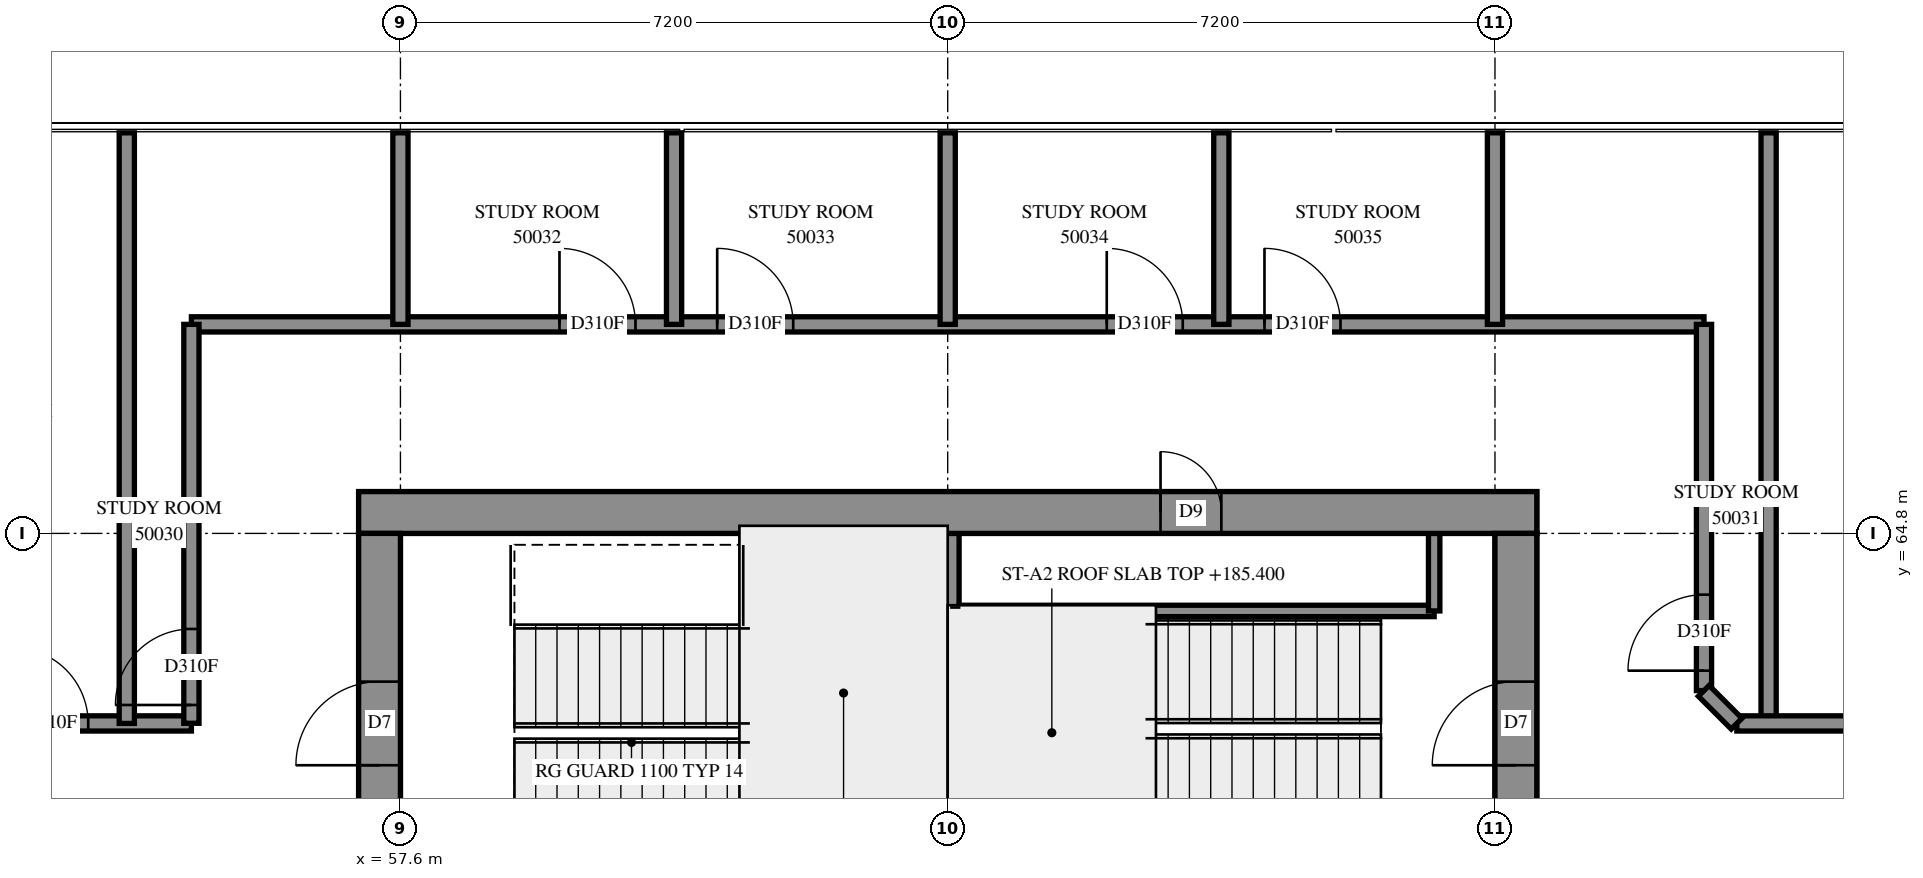
"""IFC4 building model, lengths in metres.
Left out: names, types, materials, properties, quantities, classifications, styles, units other than length and angle.
Written with IfcOpenShell. Run it as: python <this file> out.ifc"""

import sys

from ifc_helpers import new_model, si_unit, direction, frame, frame_2d, origin, place, context, subcontext, project, spatial, rectangle, extrude, element, fill, save


model = new_model("IFC4")
c1 = context("Model", 3, precision=1e-05, world=origin(), true_north=direction((0.0, 1.0)))
c2 = subcontext(c1, "Body", "Model", "MODEL_VIEW")
j1 = project(units=[si_unit("LENGTHUNIT", "METRE"), si_unit("PLANEANGLEUNIT", "RADIAN")], contexts=[c1])
p1 = place(None, origin())
s1 = spatial("IfcSite", under=j1, at=p1, CompositionType="ELEMENT")
p2 = place(p1, origin())
s2 = spatial("IfcBuilding", under=s1, at=p2, CompositionType="ELEMENT")
p3 = place(p2, frame((0.0, 0.0, 185.4)))
s3 = spatial("IfcBuildingStorey", under=s2, at=p3, CompositionType="ELEMENT", Elevation=185.4)
p4 = place(p3, frame((57.05, 65.075, -0.3), z_axis=(0.0, 0.0, 1.0), x_axis=(1.0, 0.0, 0.0)))
e1 = element("IfcWall", 1, at=p4, inside=s3, PredefinedType="SHEAR", context=c2, shape_type="SweptSolid", body=[
    extrude(rectangle(XDim=15.5, YDim=0.55, at=frame_2d((7.75, 0.0))), origin(), (0.0, 0.0, 1.0), 3.5),
])
p5 = place(p4, frame((10.55, 0.0, 0.3)))
e2 = element("IfcOpeningElement", 2, at=p5, cuts=e1, PredefinedType="OPENING", context=c2, shape_type="SweptSolid", body=[
    extrude(rectangle(XDim=0.8, YDim=2.1, at=frame_2d((0.4, 1.05))), frame((0.0, 0.285, 0.0), z_axis=(0.0, -1.0, 0.0), x_axis=(1.0, 0.0, 0.0)), (0.0, 0.0, 1.0), 0.57),
])
p6 = place(p3, frame((57.325, 50.4, -0.3), z_axis=(0.0, 0.0, 1.0), x_axis=(0.0, 1.0, 0.0)))
e3 = element("IfcWall", 3, at=p6, inside=s3, PredefinedType="SHEAR", context=c2, shape_type="SweptSolid", body=[
    extrude(rectangle(XDim=14.4, YDim=0.55, at=frame_2d((7.2, 0.0))), origin(), (0.0, 0.0, 1.0), 3.5),
])
p7 = place(p6, frame((4.55, 0.0, 0.3)))
e4 = element("IfcOpeningElement", 4, at=p7, cuts=e3, PredefinedType="OPENING", context=c2, shape_type="SweptSolid", body=[
    extrude(rectangle(XDim=1.1, YDim=2.1, at=frame_2d((0.55, 1.05))), frame((0.0, 0.285, 0.0), z_axis=(0.0, -1.0, 0.0), x_axis=(1.0, 0.0, 0.0)), (0.0, 0.0, 1.0), 0.57),
])
p8 = place(p6, frame((11.35, 0.0, 0.3)))
e5 = element("IfcOpeningElement", 5, at=p8, cuts=e3, PredefinedType="OPENING", context=c2, shape_type="SweptSolid", body=[
    extrude(rectangle(XDim=1.1, YDim=2.1, at=frame_2d((0.55, 1.05))), frame((0.0, 0.285, 0.0), z_axis=(0.0, -1.0, 0.0), x_axis=(1.0, 0.0, 0.0)), (0.0, 0.0, 1.0), 0.57),
])
p9 = place(p3, frame((72.275, 50.4, -0.3), z_axis=(0.0, 0.0, 1.0), x_axis=(0.0, 1.0, 0.0)))
e6 = element("IfcWall", 6, at=p9, inside=s3, PredefinedType="SHEAR", context=c2, shape_type="SweptSolid", body=[
    extrude(rectangle(XDim=14.4, YDim=0.55, at=frame_2d((7.2, 0.0))), origin(), (0.0, 0.0, 1.0), 3.5),
])
p10 = place(p9, frame((4.55, 0.0, 0.3)))
e7 = element("IfcOpeningElement", 7, at=p10, cuts=e6, PredefinedType="OPENING", context=c2, shape_type="SweptSolid", body=[
    extrude(rectangle(XDim=1.1, YDim=2.1, at=frame_2d((0.55, 1.05))), frame((0.0, 0.285, 0.0), z_axis=(0.0, -1.0, 0.0), x_axis=(1.0, 0.0, 0.0)), (0.0, 0.0, 1.0), 0.57),
])
p11 = place(p9, frame((11.35, 0.0, 0.3)))
e8 = element("IfcOpeningElement", 8, at=p11, cuts=e6, PredefinedType="OPENING", context=c2, shape_type="SweptSolid", body=[
    extrude(rectangle(XDim=1.1, YDim=2.1, at=frame_2d((0.55, 1.05))), frame((0.0, 0.285, 0.0), z_axis=(0.0, -1.0, 0.0), x_axis=(1.0, 0.0, 0.0)), (0.0, 0.0, 1.0), 0.57),
])
p12 = place(p3, frame((64.8, 60.6, 0.0), z_axis=(0.0, 0.0, 1.0), x_axis=(0.0, 1.0, 0.0)))
e9 = element("IfcWall", 9, at=p12, inside=s3, PredefinedType="SOLIDWALL", context=c2, shape_type="SweptSolid", body=[
    extrude(rectangle(XDim=4.2, YDim=0.3, at=frame_2d((2.1, 0.0))), origin(), (0.0, 0.0, 1.0), 3.9),
])
p13 = place(p3, frame((64.95, 63.78, 0.0), z_axis=(0.0, 0.0, 1.0), x_axis=(1.0, 0.0, 0.0)))
e10 = element("IfcWall", 10, at=p13, inside=s3, PredefinedType="PARTITIONING", context=c2, shape_type="SweptSolid", body=[
    extrude(rectangle(XDim=6.25, YDim=0.15, at=frame_2d((3.125, 0.0))), origin(), (0.0, 0.0, 1.0), 3.9),
])
p14 = place(p3, frame((71.2, 63.78, 0.0), z_axis=(0.0, 0.0, 1.0), x_axis=(0.0, 1.0, 0.0)))
e11 = element("IfcWall", 11, at=p14, inside=s3, PredefinedType="PARTITIONING", context=c2, shape_type="SweptSolid", body=[
    extrude(rectangle(XDim=1.02, YDim=0.15, at=frame_2d((0.51, 0.0))), origin(), (0.0, 0.0, 1.0), 3.9),
])
p15 = place(p3, frame((54.85, 67.55, 0.0), z_axis=(0.0, 0.0, 1.0), x_axis=(1.0, 0.0, 0.0)))
e12 = element("IfcWall", 12, at=p15, inside=s3, PredefinedType="PARTITIONING", context=c2, shape_type="SweptSolid", body=[
    extrude(rectangle(XDim=19.9, YDim=0.2, at=frame_2d((9.95, 0.0))), origin(), (0.0, 0.0, 1.0), 3.9),
])
p16 = place(p15, frame((4.843, 0.0, 0.0)))
e13 = element("IfcOpeningElement", 13, at=p16, cuts=e12, PredefinedType="OPENING", context=c2, shape_type="SweptSolid", body=[
    extrude(rectangle(XDim=1.0, YDim=2.1, at=frame_2d((0.5, 1.05))), frame((0.0, 0.11, 0.0), z_axis=(0.0, -1.0, 0.0), x_axis=(1.0, 0.0, 0.0)), (0.0, 0.0, 1.0), 0.22),
])
p17 = place(p15, frame((6.918, 0.0, 0.0)))
e14 = element("IfcOpeningElement", 14, at=p17, cuts=e12, PredefinedType="OPENING", context=c2, shape_type="SweptSolid", body=[
    extrude(rectangle(XDim=1.0, YDim=2.1, at=frame_2d((0.5, 1.05))), frame((0.0, 0.11, 0.0), z_axis=(0.0, -1.0, 0.0), x_axis=(1.0, 0.0, 0.0)), (0.0, 0.0, 1.0), 0.22),
])
p18 = place(p15, frame((12.043, 0.0, 0.0)))
e15 = element("IfcOpeningElement", 15, at=p18, cuts=e12, PredefinedType="OPENING", context=c2, shape_type="SweptSolid", body=[
    extrude(rectangle(XDim=1.0, YDim=2.1, at=frame_2d((0.5, 1.05))), frame((0.0, 0.11, 0.0), z_axis=(0.0, -1.0, 0.0), x_axis=(1.0, 0.0, 0.0)), (0.0, 0.0, 1.0), 0.22),
])
p19 = place(p15, frame((14.117, 0.0, 0.0)))
e16 = element("IfcOpeningElement", 16, at=p19, cuts=e12, PredefinedType="OPENING", context=c2, shape_type="SweptSolid", body=[
    extrude(rectangle(XDim=1.0, YDim=2.1, at=frame_2d((0.5, 1.05))), frame((0.0, 0.11, 0.0), z_axis=(0.0, -1.0, 0.0), x_axis=(1.0, 0.0, 0.0)), (0.0, 0.0, 1.0), 0.22),
])
p20 = place(p3, frame((40.702, 62.3, 0.0), z_axis=(0.0, 0.0, 1.0), x_axis=(1.0, 0.0, 0.0)))
e17 = element("IfcWall", 17, at=p20, inside=s3, PredefinedType="PARTITIONING", context=c2, shape_type="SweptSolid", body=[
    extrude(rectangle(XDim=14.148, YDim=0.2, at=frame_2d((7.074, 0.0))), origin(), (0.0, 0.0, 1.0), 3.9),
])
p21 = place(p20, frame((6.361, 0.0, 0.0)))
e18 = element("IfcOpeningElement", 18, at=p21, cuts=e17, PredefinedType="OPENING", context=c2, shape_type="SweptSolid", body=[
    extrude(rectangle(XDim=1.0, YDim=2.1, at=frame_2d((0.5, 1.05))), frame((0.0, 0.11, 0.0), z_axis=(0.0, -1.0, 0.0), x_axis=(1.0, 0.0, 0.0)), (0.0, 0.0, 1.0), 0.22),
])
p22 = place(p20, frame((11.79, 0.0, 0.0)))
e19 = element("IfcOpeningElement", 19, at=p22, cuts=e17, PredefinedType="OPENING", context=c2, shape_type="SweptSolid", body=[
    extrude(rectangle(XDim=1.0, YDim=2.1, at=frame_2d((0.5, 1.05))), frame((0.0, 0.11, 0.0), z_axis=(0.0, -1.0, 0.0), x_axis=(1.0, 0.0, 0.0)), (0.0, 0.0, 1.0), 0.22),
])
for number, where, z_axis, x_axis in (
    (20, (54.0, 62.3, 0.0), (0.0, 0.0, 1.0), (0.0, 1.0, 0.0)),
    (21, (75.6, 62.3, 0.0), (0.0, 0.0, 1.0), (0.0, 1.0, 0.0)),
):
    element("IfcWall", number, at=place(p3, frame(where, z_axis=z_axis, x_axis=x_axis)), inside=s3, PredefinedType="PARTITIONING", context=c2, shape_type="SweptSolid", body=[
        extrude(rectangle(XDim=7.77, YDim=0.2, at=frame_2d((3.885, 0.0))), origin(), (0.0, 0.0, 1.0), 3.9),
    ])
p23 = place(p3, frame((54.85, 62.302, 0.0), z_axis=(0.0, 0.0, 1.0), x_axis=(0.0, 1.0, 0.0)))
e22 = element("IfcWall", 22, at=p23, inside=s3, PredefinedType="PARTITIONING", context=c2, shape_type="SweptSolid", body=[
    extrude(rectangle(XDim=5.248, YDim=0.2, at=frame_2d((2.624, 0.0))), origin(), (0.0, 0.0, 1.0), 3.9),
])
p24 = place(p23, frame((0.241, 0.0, 0.0)))
e23 = element("IfcOpeningElement", 23, at=p24, cuts=e22, PredefinedType="OPENING", context=c2, shape_type="SweptSolid", body=[
    extrude(rectangle(XDim=1.0, YDim=2.1, at=frame_2d((0.5, 1.05))), frame((0.0, 0.11, 0.0), z_axis=(0.0, -1.0, 0.0), x_axis=(1.0, 0.0, 0.0)), (0.0, 0.0, 1.0), 0.22),
])
p25 = place(p3, frame((74.75, 62.732, 0.0), z_axis=(0.0, 0.0, 1.0), x_axis=(0.0, 1.0, 0.0)))
e24 = element("IfcWall", 24, at=p25, inside=s3, PredefinedType="PARTITIONING", context=c2, shape_type="SweptSolid", body=[
    extrude(rectangle(XDim=4.818, YDim=0.2, at=frame_2d((2.409, 0.0))), origin(), (0.0, 0.0, 1.0), 3.9),
])
p26 = place(p25, frame((0.262, 0.0, 0.0)))
e25 = element("IfcOpeningElement", 25, at=p26, cuts=e24, PredefinedType="OPENING", context=c2, shape_type="SweptSolid", body=[
    extrude(rectangle(XDim=1.0, YDim=2.1, at=frame_2d((0.5, 1.05))), frame((0.0, 0.11, 0.0), z_axis=(0.0, -1.0, 0.0), x_axis=(1.0, 0.0, 0.0)), (0.0, 0.0, 1.0), 0.22),
])
p27 = place(p3, frame((75.182, 62.3, 0.0), z_axis=(0.0, 0.0, 1.0), x_axis=(1.0, 0.0, 0.0)))
e26 = element("IfcWall", 26, at=p27, inside=s3, PredefinedType="PARTITIONING", context=c2, shape_type="SweptSolid", body=[
    extrude(rectangle(XDim=4.018, YDim=0.2, at=frame_2d((2.009, 0.0))), origin(), (0.0, 0.0, 1.0), 3.9),
])
for number, where, z_axis, x_axis in (
    (27, (57.6, 67.55, 0.0), (0.0, 0.0, 1.0), (0.0, 1.0, 0.0)),
    (28, (61.2, 67.55, 0.0), (0.0, 0.0, 1.0), (0.0, 1.0, 0.0)),
    (29, (64.8, 67.55, 0.0), (0.0, 0.0, 1.0), (0.0, 1.0, 0.0)),
    (30, (68.4, 67.55, 0.0), (0.0, 0.0, 1.0), (0.0, 1.0, 0.0)),
    (31, (72.0, 67.55, 0.0), (0.0, 0.0, 1.0), (0.0, 1.0, 0.0)),
):
    element("IfcWall", number, at=place(p3, frame(where, z_axis=z_axis, x_axis=x_axis)), inside=s3, PredefinedType="PARTITIONING", context=c2, shape_type="SweptSolid", body=[
        extrude(rectangle(XDim=2.52, YDim=0.2, at=frame_2d((1.26, 0.0))), origin(), (0.0, 0.0, 1.0), 3.9),
    ])
p28 = place(p3, frame((74.747, 62.729, 0.0), z_axis=(0.0, 0.0, 1.0), x_axis=(0.7071067812, -0.7071067812, 0.0)))
e32 = element("IfcWall", 32, at=p28, inside=s3, PredefinedType="PARTITIONING", context=c2, shape_type="SweptSolid", body=[
    extrude(rectangle(XDim=0.611, YDim=0.2, at=frame_2d((0.305, 0.0))), origin(), (0.0, 0.0, 1.0), 3.9),
])
p29 = place(p5, origin())
e33 = element("IfcDoor", 33, at=p29, inside=s3, OperationType="SINGLE_SWING_RIGHT", PredefinedType="DOOR", context=c2, shape_type="SweptSolid", body=[
    extrude(rectangle(XDim=0.8, YDim=2.1, at=frame_2d((0.4, 1.05))), frame((0.0, 0.025, 0.0), z_axis=(0.0, -1.0, 0.0), x_axis=(1.0, 0.0, 0.0)), (0.0, 0.0, 1.0), 0.05),
])
fill(e2, e33)
p30 = place(p8, origin())
e34 = element("IfcDoor", 34, at=p30, inside=s3, OperationType="SINGLE_SWING_LEFT", PredefinedType="DOOR", context=c2, shape_type="SweptSolid", body=[
    extrude(rectangle(XDim=1.1, YDim=2.1, at=frame_2d((0.55, 1.05))), frame((0.0, 0.025, 0.0), z_axis=(0.0, -1.0, 0.0), x_axis=(1.0, 0.0, 0.0)), (0.0, 0.0, 1.0), 0.05),
])
fill(e5, e34)
p31 = place(p11, origin())
e35 = element("IfcDoor", 35, at=p31, inside=s3, OperationType="SINGLE_SWING_RIGHT", PredefinedType="DOOR", context=c2, shape_type="SweptSolid", body=[
    extrude(rectangle(XDim=1.1, YDim=2.1, at=frame_2d((0.55, 1.05))), frame((0.0, 0.025, 0.0), z_axis=(0.0, -1.0, 0.0), x_axis=(1.0, 0.0, 0.0)), (0.0, 0.0, 1.0), 0.05),
])
fill(e8, e35)
p32 = place(p22, origin())
e36 = element("IfcDoor", 36, at=p32, inside=s3, OperationType="SINGLE_SWING_RIGHT", PredefinedType="DOOR", context=c2, shape_type="SweptSolid", body=[
    extrude(rectangle(XDim=1.0, YDim=2.1, at=frame_2d((0.5, 1.05))), frame((0.0, 0.025, 0.0), z_axis=(0.0, -1.0, 0.0), x_axis=(1.0, 0.0, 0.0)), (0.0, 0.0, 1.0), 0.05),
])
fill(e19, e36)
p33 = place(p24, origin())
e37 = element("IfcDoor", 37, at=p33, inside=s3, OperationType="SINGLE_SWING_LEFT", PredefinedType="DOOR", context=c2, shape_type="SweptSolid", body=[
    extrude(rectangle(XDim=1.0, YDim=2.1, at=frame_2d((0.5, 1.05))), frame((0.0, 0.025, 0.0), z_axis=(0.0, -1.0, 0.0), x_axis=(1.0, 0.0, 0.0)), (0.0, 0.0, 1.0), 0.05),
])
fill(e23, e37)
p34 = place(p26, origin())
e38 = element("IfcDoor", 38, at=p34, inside=s3, OperationType="SINGLE_SWING_RIGHT", PredefinedType="DOOR", context=c2, shape_type="SweptSolid", body=[
    extrude(rectangle(XDim=1.0, YDim=2.1, at=frame_2d((0.5, 1.05))), frame((0.0, 0.025, 0.0), z_axis=(0.0, -1.0, 0.0), x_axis=(1.0, 0.0, 0.0)), (0.0, 0.0, 1.0), 0.05),
])
fill(e25, e38)
p35 = place(p16, origin())
e39 = element("IfcDoor", 39, at=p35, inside=s3, OperationType="SINGLE_SWING_RIGHT", PredefinedType="DOOR", context=c2, shape_type="SweptSolid", body=[
    extrude(rectangle(XDim=1.0, YDim=2.1, at=frame_2d((0.5, 1.05))), frame((0.0, 0.025, 0.0), z_axis=(0.0, -1.0, 0.0), x_axis=(1.0, 0.0, 0.0)), (0.0, 0.0, 1.0), 0.05),
])
fill(e13, e39)
p36 = place(p17, origin())
e40 = element("IfcDoor", 40, at=p36, inside=s3, OperationType="SINGLE_SWING_LEFT", PredefinedType="DOOR", context=c2, shape_type="SweptSolid", body=[
    extrude(rectangle(XDim=1.0, YDim=2.1, at=frame_2d((0.5, 1.05))), frame((0.0, 0.025, 0.0), z_axis=(0.0, -1.0, 0.0), x_axis=(1.0, 0.0, 0.0)), (0.0, 0.0, 1.0), 0.05),
])
fill(e14, e40)
p37 = place(p18, origin())
e41 = element("IfcDoor", 41, at=p37, inside=s3, OperationType="SINGLE_SWING_RIGHT", PredefinedType="DOOR", context=c2, shape_type="SweptSolid", body=[
    extrude(rectangle(XDim=1.0, YDim=2.1, at=frame_2d((0.5, 1.05))), frame((0.0, 0.025, 0.0), z_axis=(0.0, -1.0, 0.0), x_axis=(1.0, 0.0, 0.0)), (0.0, 0.0, 1.0), 0.05),
])
fill(e15, e41)
p38 = place(p19, origin())
e42 = element("IfcDoor", 42, at=p38, inside=s3, OperationType="SINGLE_SWING_LEFT", PredefinedType="DOOR", context=c2, shape_type="SweptSolid", body=[
    extrude(rectangle(XDim=1.0, YDim=2.1, at=frame_2d((0.5, 1.05))), frame((0.0, 0.025, 0.0), z_axis=(0.0, -1.0, 0.0), x_axis=(1.0, 0.0, 0.0)), (0.0, 0.0, 1.0), 0.05),
])
fill(e16, e42)
save(model, sys.argv[1])
